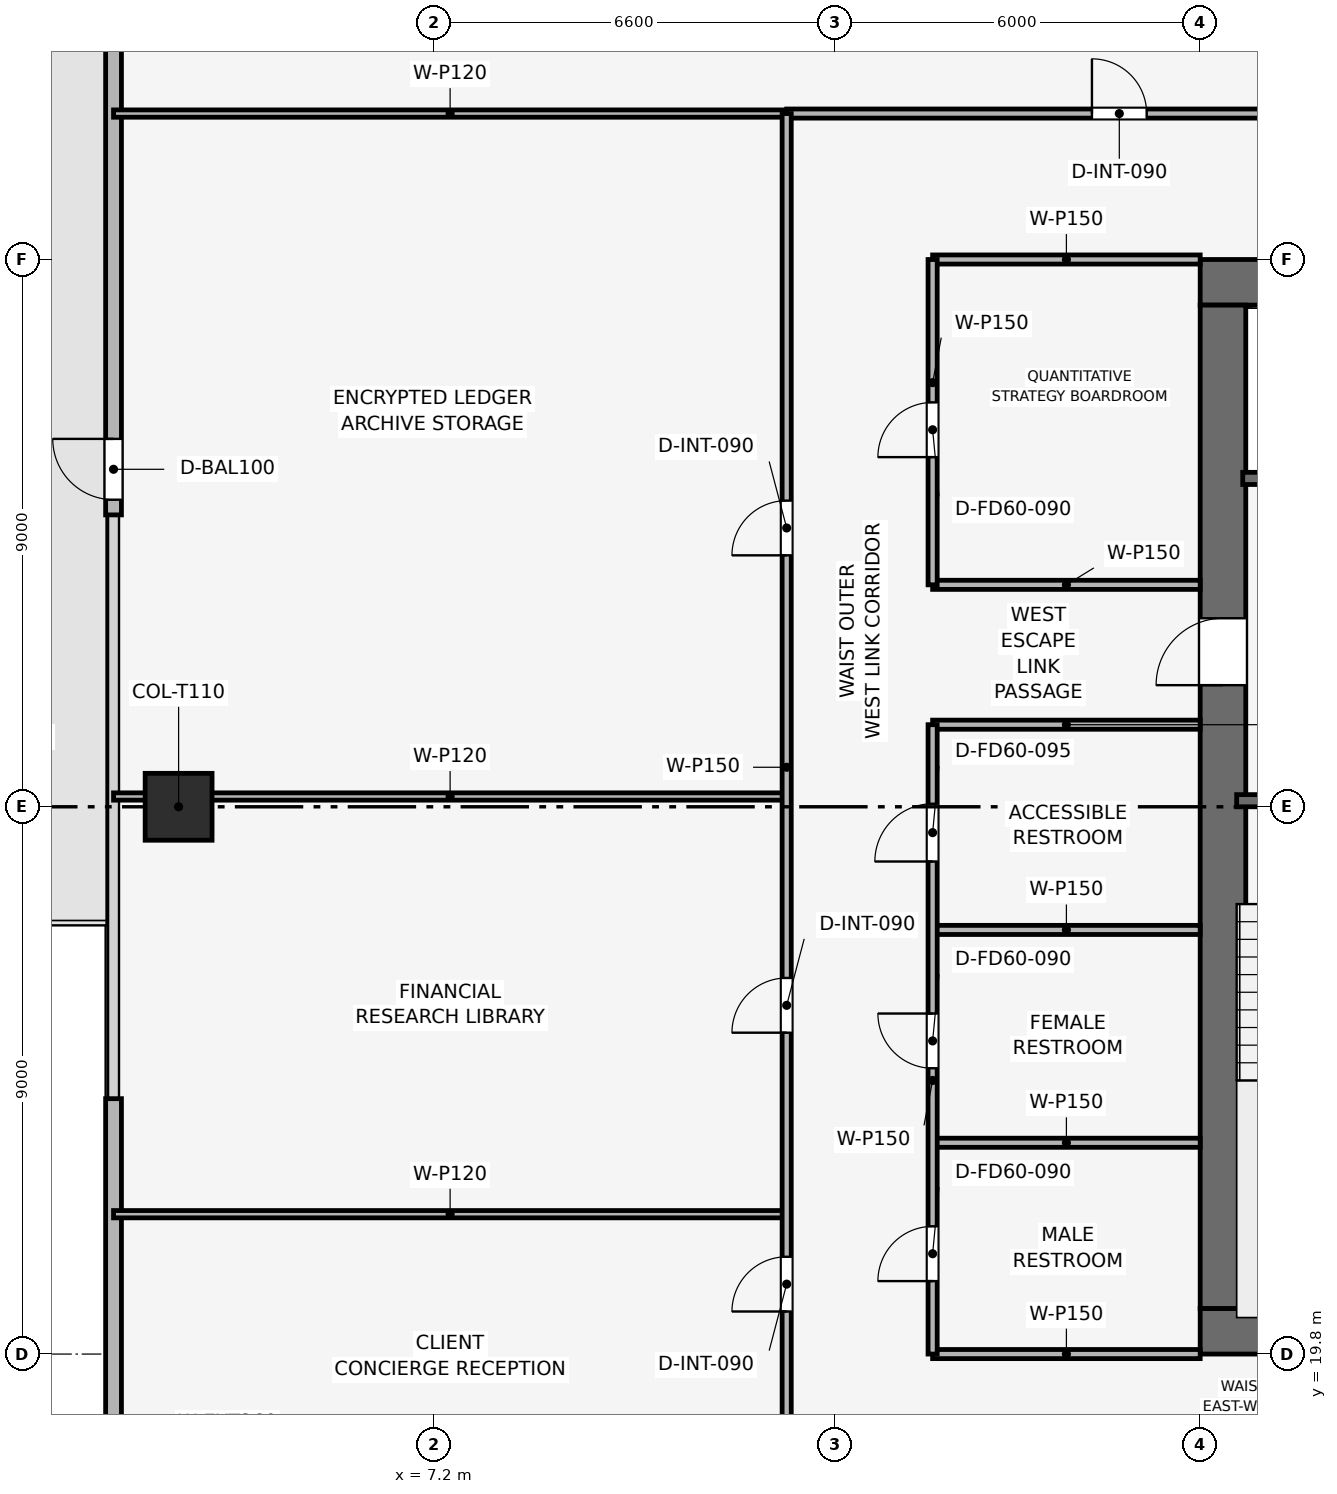
"""IFC4 building model, lengths in metres.
Left out: names, types, materials, properties, quantities, classifications, styles, units other than length and angle.
Written with IfcOpenShell. Run it as: python <this file> out.ifc"""

import sys

from ifc_helpers import new_model, si_unit, direction, frame, frame_2d, origin, origin_2d, place, context, subcontext, project, spatial, rectangle, extrude, element, fill, save


model = new_model("IFC4")
c1 = context("Model", 3, precision=1e-05, world=origin(), true_north=direction((0.0, 1.0)))
c2 = subcontext(c1, "Body", "Model", "MODEL_VIEW")
j1 = project(units=[si_unit("LENGTHUNIT", "METRE"), si_unit("PLANEANGLEUNIT", "RADIAN")], contexts=[c1])
p1 = place(None, origin())
s1 = spatial("IfcSite", under=j1, at=p1, CompositionType="ELEMENT")
p2 = place(p1, origin())
s2 = spatial("IfcBuilding", under=s1, at=p2, CompositionType="ELEMENT")
p3 = place(p2, frame((0.0, 0.0, 207.45)))
s3 = spatial("IfcBuildingStorey", under=s2, at=p3, CompositionType="ELEMENT", Elevation=207.45)
p4 = place(p3, frame((19.8, 20.175, 0.0), z_axis=(0.0, 0.0, 1.0), x_axis=(1.0, 0.0, 0.0)))
e1 = element("IfcWall", 1, at=p4, inside=s3, PredefinedType="SHEAR", context=c2, shape_type="SweptSolid", body=[
    extrude(rectangle(XDim=18.0, YDim=0.75, at=frame_2d((9.0, 0.0))), origin(), (0.0, 0.0, 1.0), 3.75),
])
p5 = place(p4, frame((8.4, 0.0, 0.0)))
e2 = element("IfcOpeningElement", 2, at=p5, cuts=e1, PredefinedType="OPENING", context=c2, shape_type="SweptSolid", body=[
    extrude(rectangle(XDim=1.2, YDim=2.2, at=frame_2d((0.6, 1.1))), frame((0.0, 0.385, 0.0), z_axis=(0.0, -1.0, 0.0), x_axis=(1.0, 0.0, 0.0)), (0.0, 0.0, 1.0), 0.77),
])
p6 = place(p3, frame((19.8, 37.425, 0.0), z_axis=(0.0, 0.0, 1.0), x_axis=(1.0, 0.0, 0.0)))
e3 = element("IfcWall", 3, at=p6, inside=s3, PredefinedType="SHEAR", context=c2, shape_type="SweptSolid", body=[
    extrude(rectangle(XDim=18.0, YDim=0.75, at=frame_2d((9.0, 0.0))), origin(), (0.0, 0.0, 1.0), 3.75),
])
p7 = place(p6, frame((7.05, 0.0, 0.0)))
e4 = element("IfcOpeningElement", 4, at=p7, cuts=e3, PredefinedType="OPENING", context=c2, shape_type="SweptSolid", body=[
    extrude(rectangle(XDim=1.1, YDim=2.15, at=frame_2d((0.55, 1.075))), frame((0.0, 0.385, 0.0), z_axis=(0.0, -1.0, 0.0), x_axis=(1.0, 0.0, 0.0)), (0.0, 0.0, 1.0), 0.77),
])
p8 = place(p3, frame((20.175, 20.55, 0.0), z_axis=(0.0, 0.0, 1.0), x_axis=(0.0, 1.0, 0.0)))
e5 = element("IfcWall", 5, at=p8, inside=s3, PredefinedType="SHEAR", context=c2, shape_type="SweptSolid", body=[
    extrude(rectangle(XDim=16.5, YDim=0.75, at=frame_2d((8.25, 0.0))), origin(), (0.0, 0.0, 1.0), 3.75),
])
p9 = place(p8, frame((10.25, 0.0, 0.0)))
e6 = element("IfcOpeningElement", 6, at=p9, cuts=e5, PredefinedType="OPENING", context=c2, shape_type="SweptSolid", body=[
    extrude(rectangle(XDim=1.1, YDim=2.15, at=frame_2d((0.55, 1.075))), frame((0.0, 0.385, 0.0), z_axis=(0.0, -1.0, 0.0), x_axis=(1.0, 0.0, 0.0)), (0.0, 0.0, 1.0), 0.77),
])
p10 = place(p3, frame((3.0, 28.8, 0.003), z_axis=(0.0, 0.0, 1.0), x_axis=(1.0, 0.0, 0.0)))
e7 = element("IfcColumn", 7, at=p10, inside=s3, PredefinedType="COLUMN", context=c2, shape_type="SweptSolid", body=[
    extrude(rectangle(XDim=1.1, YDim=1.1, at=origin_2d()), origin(), (0.0, 0.0, 1.0), 3.494),
])
p11 = place(p3, frame((1.93, 9.3, 0.0), z_axis=(0.0, 0.0, 1.0), x_axis=(0.0, 1.0, 0.0)))
e8 = element("IfcWall", 8, at=p11, inside=s3, PredefinedType="SOLIDWALL", context=c2, shape_type="SweptSolid", body=[
    extrude(rectangle(XDim=14.7, YDim=0.26, at=frame_2d((7.35, 0.0))), origin(), (0.0, 0.0, 1.0), 3.5),
])
p12 = place(p11, frame((0.25, 0.0, 0.9)))
e9 = element("IfcOpeningElement", 9, at=p12, cuts=e8, PredefinedType="OPENING", context=c2, shape_type="SweptSolid", body=[
    extrude(rectangle(XDim=3.8, YDim=1.9, at=frame_2d((1.9, 0.95))), frame((0.0, 0.14, 0.0), z_axis=(0.0, -1.0, 0.0), x_axis=(1.0, 0.0, 0.0)), (0.0, 0.0, 1.0), 0.28),
])
p13 = place(p3, frame((1.93, 33.6, 0.0), z_axis=(0.0, 0.0, 1.0), x_axis=(0.0, 1.0, 0.0)))
e10 = element("IfcWall", 10, at=p13, inside=s3, PredefinedType="SOLIDWALL", context=c2, shape_type="SweptSolid", body=[
    extrude(rectangle(XDim=14.7, YDim=0.26, at=frame_2d((7.35, 0.0))), origin(), (0.0, 0.0, 1.0), 3.5),
])
p14 = place(p13, frame((0.25, 0.0, 0.0)))
e11 = element("IfcOpeningElement", 11, at=p14, cuts=e10, PredefinedType="OPENING", context=c2, shape_type="SweptSolid", body=[
    extrude(rectangle(XDim=1.0, YDim=2.2, at=frame_2d((0.5, 1.1))), frame((0.0, 0.14, 0.0), z_axis=(0.0, -1.0, 0.0), x_axis=(1.0, 0.0, 0.0)), (0.0, 0.0, 1.0), 0.28),
])
p15 = place(p3, frame((20.4, 28.9, 0.0), z_axis=(0.0, 0.0, 1.0), x_axis=(1.0, 0.0, 0.0)))
e12 = element("IfcWall", 12, at=p15, inside=s3, PredefinedType="SHEAR", context=c2, shape_type="SweptSolid", body=[
    extrude(rectangle(XDim=3.15, YDim=0.2, at=frame_2d((1.575, 0.0))), origin(), (0.0, 0.0, 1.0), 3.5),
])
p16 = place(p15, frame((0.8, 0.0, 0.0)))
e13 = element("IfcOpeningElement", 13, at=p16, cuts=e12, PredefinedType="OPENING", context=c2, shape_type="SweptSolid", body=[
    extrude(rectangle(XDim=1.0, YDim=2.1, at=frame_2d((0.5, 1.05))), frame((0.0, 0.11, 0.0), z_axis=(0.0, -1.0, 0.0), x_axis=(1.0, 0.0, 0.0)), (0.0, 0.0, 1.0), 0.22),
])
p17 = place(p3, frame((20.5, 34.2, 0.0), z_axis=(0.0, 0.0, 1.0), x_axis=(1.0, 0.0, 0.0)))
e14 = element("IfcWall", 14, at=p17, inside=s3, PredefinedType="SHEAR", context=c2, shape_type="SweptSolid", body=[
    extrude(rectangle(XDim=3.05, YDim=0.2, at=frame_2d((1.525, 0.0))), origin(), (0.0, 0.0, 1.0), 3.5),
])
p18 = place(p17, frame((0.75, 0.0, 0.0)))
e15 = element("IfcOpeningElement", 15, at=p18, cuts=e14, PredefinedType="OPENING", context=c2, shape_type="SweptSolid", body=[
    extrude(rectangle(XDim=1.1, YDim=2.15, at=frame_2d((0.55, 1.075))), frame((0.0, 0.11, 0.0), z_axis=(0.0, -1.0, 0.0), x_axis=(1.0, 0.0, 0.0)), (0.0, 0.0, 1.0), 0.22),
])
p19 = place(p3, frame((15.4, 19.8, 0.0), z_axis=(0.0, 0.0, 1.0), x_axis=(1.0, 0.0, 0.0)))
e16 = element("IfcWall", 16, at=p19, inside=s3, PredefinedType="PARTITIONING", context=c2, shape_type="SweptSolid", body=[
    extrude(rectangle(XDim=4.4, YDim=0.15, at=frame_2d((2.2, 0.0))), origin(), (0.0, 0.0, 1.0), 3.035),
])
for number, where, z_axis, x_axis in (
    (17, (15.4, 23.275, 0.0), (0.0, 0.0, 1.0), (1.0, 0.0, 0.0)),
    (18, (15.4, 26.775, 0.0), (0.0, 0.0, 1.0), (1.0, 0.0, 0.0)),
    (19, (15.4, 30.15, 0.0), (0.0, 0.0, 1.0), (1.0, 0.0, 0.0)),
    (20, (15.4, 32.45, 0.0), (0.0, 0.0, 1.0), (1.0, 0.0, 0.0)),
):
    element("IfcWall", number, at=place(p3, frame(where, z_axis=z_axis, x_axis=x_axis)), inside=s3, PredefinedType="PARTITIONING", context=c2, shape_type="SweptSolid", body=[
        extrude(rectangle(XDim=4.4, YDim=0.15, at=frame_2d((2.2, 0.0))), origin(), (0.0, 0.0, 1.0), 3.5),
    ])
p20 = place(p3, frame((15.4, 37.8, 0.0), z_axis=(0.0, 0.0, 1.0), x_axis=(1.0, 0.0, 0.0)))
e21 = element("IfcWall", 21, at=p20, inside=s3, PredefinedType="PARTITIONING", context=c2, shape_type="SweptSolid", body=[
    extrude(rectangle(XDim=4.4, YDim=0.15, at=frame_2d((2.2, 0.0))), origin(), (0.0, 0.0, 1.0), 3.035),
])
p21 = place(p3, frame((15.4, 19.8, 0.0), z_axis=(0.0, 0.0, 1.0), x_axis=(0.0, 1.0, 0.0)))
e22 = element("IfcWall", 22, at=p21, inside=s3, PredefinedType="PARTITIONING", context=c2, shape_type="SweptSolid", body=[
    extrude(rectangle(XDim=10.35, YDim=0.15, at=frame_2d((5.175, 0.0))), origin(), (0.0, 0.0, 1.0), 3.035),
])
p22 = place(p21, frame((1.2, 0.0, 0.0)))
e23 = element("IfcOpeningElement", 23, at=p22, cuts=e22, PredefinedType="OPENING", context=c2, shape_type="SweptSolid", body=[
    extrude(rectangle(XDim=0.9, YDim=2.1, at=frame_2d((0.45, 1.05))), frame((0.0, 0.085, 0.0), z_axis=(0.0, -1.0, 0.0), x_axis=(1.0, 0.0, 0.0)), (0.0, 0.0, 1.0), 0.17),
])
p23 = place(p21, frame((4.7, 0.0, 0.0)))
e24 = element("IfcOpeningElement", 24, at=p23, cuts=e22, PredefinedType="OPENING", context=c2, shape_type="SweptSolid", body=[
    extrude(rectangle(XDim=0.9, YDim=2.1, at=frame_2d((0.45, 1.05))), frame((0.0, 0.085, 0.0), z_axis=(0.0, -1.0, 0.0), x_axis=(1.0, 0.0, 0.0)), (0.0, 0.0, 1.0), 0.17),
])
p24 = place(p21, frame((8.1, 0.0, 0.0)))
e25 = element("IfcOpeningElement", 25, at=p24, cuts=e22, PredefinedType="OPENING", context=c2, shape_type="SweptSolid", body=[
    extrude(rectangle(XDim=0.95, YDim=2.1, at=frame_2d((0.475, 1.05))), frame((0.0, 0.085, 0.0), z_axis=(0.0, -1.0, 0.0), x_axis=(1.0, 0.0, 0.0)), (0.0, 0.0, 1.0), 0.17),
])
p25 = place(p3, frame((15.4, 32.45, 0.0), z_axis=(0.0, 0.0, 1.0), x_axis=(0.0, 1.0, 0.0)))
e26 = element("IfcWall", 26, at=p25, inside=s3, PredefinedType="PARTITIONING", context=c2, shape_type="SweptSolid", body=[
    extrude(rectangle(XDim=5.35, YDim=0.15, at=frame_2d((2.675, 0.0))), origin(), (0.0, 0.0, 1.0), 3.035),
])
p26 = place(p25, frame((2.1, 0.0, 0.0)))
e27 = element("IfcOpeningElement", 27, at=p26, cuts=e26, PredefinedType="OPENING", context=c2, shape_type="SweptSolid", body=[
    extrude(rectangle(XDim=0.9, YDim=2.1, at=frame_2d((0.45, 1.05))), frame((0.0, 0.085, 0.0), z_axis=(0.0, -1.0, 0.0), x_axis=(1.0, 0.0, 0.0)), (0.0, 0.0, 1.0), 0.17),
])
for number, where, z_axis, x_axis in (
    (28, (1.93, 22.1, 0.0), (0.0, 0.0, 1.0), (1.0, 0.0, 0.0)),
    (29, (1.93, 28.969, 0.0), (0.0, 0.0, 1.0), (1.0, 0.0, 0.0)),
    (30, (1.93, 40.2, 0.0), (0.0, 0.0, 1.0), (1.0, 0.0, 0.0)),
):
    element("IfcWall", number, at=place(p3, frame(where, z_axis=z_axis, x_axis=x_axis)), inside=s3, PredefinedType="PARTITIONING", context=c2, shape_type="SweptSolid", body=[
        extrude(rectangle(XDim=11.07, YDim=0.12, at=frame_2d((5.535, 0.0))), origin(), (0.0, 0.0, 1.0), 2.885),
    ])
p27 = place(p3, frame((13.0, 40.2, 0.0), z_axis=(0.0, 0.0, 1.0), x_axis=(1.0, 0.0, 0.0)))
e31 = element("IfcWall", 31, at=p27, inside=s3, PredefinedType="PARTITIONING", context=c2, shape_type="SweptSolid", body=[
    extrude(rectangle(XDim=31.6, YDim=0.15, at=frame_2d((15.8, 0.0))), origin(), (0.0, 0.0, 1.0), 3.035),
])
p28 = place(p27, frame((5.02, 0.0, 0.0)))
e32 = element("IfcOpeningElement", 32, at=p28, cuts=e31, PredefinedType="OPENING", context=c2, shape_type="SweptSolid", body=[
    extrude(rectangle(XDim=0.9, YDim=2.1, at=frame_2d((0.45, 1.05))), frame((0.0, 0.085, 0.0), z_axis=(0.0, -1.0, 0.0), x_axis=(1.0, 0.0, 0.0)), (0.0, 0.0, 1.0), 0.17),
])
p29 = place(p27, frame((20.82, 0.0, 0.0)))
e33 = element("IfcOpeningElement", 33, at=p29, cuts=e31, PredefinedType="OPENING", context=c2, shape_type="SweptSolid", body=[
    extrude(rectangle(XDim=0.9, YDim=2.1, at=frame_2d((0.45, 1.05))), frame((0.0, 0.085, 0.0), z_axis=(0.0, -1.0, 0.0), x_axis=(1.0, 0.0, 0.0)), (0.0, 0.0, 1.0), 0.17),
])
p30 = place(p3, frame((13.0, 17.4, 0.0), z_axis=(0.0, 0.0, 1.0), x_axis=(0.0, 1.0, 0.0)))
e34 = element("IfcWall", 34, at=p30, inside=s3, PredefinedType="PARTITIONING", context=c2, shape_type="SweptSolid", body=[
    extrude(rectangle(XDim=22.8, YDim=0.15, at=frame_2d((11.4, 0.0))), origin(), (0.0, 0.0, 1.0), 3.035),
])
p31 = place(p30, frame((3.1, 0.0, 0.0)))
e35 = element("IfcOpeningElement", 35, at=p31, cuts=e34, PredefinedType="OPENING", context=c2, shape_type="SweptSolid", body=[
    extrude(rectangle(XDim=0.9, YDim=2.1, at=frame_2d((0.45, 1.05))), frame((0.0, 0.085, 0.0), z_axis=(0.0, -1.0, 0.0), x_axis=(1.0, 0.0, 0.0)), (0.0, 0.0, 1.0), 0.17),
])
p32 = place(p30, frame((7.685, 0.0, 0.0)))
e36 = element("IfcOpeningElement", 36, at=p32, cuts=e34, PredefinedType="OPENING", context=c2, shape_type="SweptSolid", body=[
    extrude(rectangle(XDim=0.9, YDim=2.1, at=frame_2d((0.45, 1.05))), frame((0.0, 0.085, 0.0), z_axis=(0.0, -1.0, 0.0), x_axis=(1.0, 0.0, 0.0)), (0.0, 0.0, 1.0), 0.17),
])
p33 = place(p30, frame((15.535, 0.0, 0.0)))
e37 = element("IfcOpeningElement", 37, at=p33, cuts=e34, PredefinedType="OPENING", context=c2, shape_type="SweptSolid", body=[
    extrude(rectangle(XDim=0.9, YDim=2.1, at=frame_2d((0.45, 1.05))), frame((0.0, 0.085, 0.0), z_axis=(0.0, -1.0, 0.0), x_axis=(1.0, 0.0, 0.0)), (0.0, 0.0, 1.0), 0.17),
])
p34 = place(p14, origin())
e38 = element("IfcDoor", 38, at=p34, inside=s3, OperationType="SINGLE_SWING_RIGHT", PredefinedType="DOOR", context=c2, shape_type="SweptSolid", body=[
    extrude(rectangle(XDim=1.0, YDim=2.2, at=frame_2d((0.5, 1.1))), frame((0.0, 0.025, 0.0), z_axis=(0.0, -1.0, 0.0), x_axis=(1.0, 0.0, 0.0)), (0.0, 0.0, 1.0), 0.05),
])
fill(e11, e38)
p35 = place(p22, origin())
e39 = element("IfcDoor", 39, at=p35, inside=s3, OperationType="SINGLE_SWING_LEFT", PredefinedType="DOOR", context=c2, shape_type="SweptSolid", body=[
    extrude(rectangle(XDim=0.9, YDim=2.1, at=frame_2d((0.45, 1.05))), frame((0.0, 0.025, 0.0), z_axis=(0.0, -1.0, 0.0), x_axis=(1.0, 0.0, 0.0)), (0.0, 0.0, 1.0), 0.05),
])
fill(e23, e39)
p36 = place(p23, origin())
e40 = element("IfcDoor", 40, at=p36, inside=s3, OperationType="SINGLE_SWING_RIGHT", PredefinedType="DOOR", context=c2, shape_type="SweptSolid", body=[
    extrude(rectangle(XDim=0.9, YDim=2.1, at=frame_2d((0.45, 1.05))), frame((0.0, 0.025, 0.0), z_axis=(0.0, -1.0, 0.0), x_axis=(1.0, 0.0, 0.0)), (0.0, 0.0, 1.0), 0.05),
])
fill(e24, e40)
p37 = place(p24, origin())
e41 = element("IfcDoor", 41, at=p37, inside=s3, OperationType="SINGLE_SWING_LEFT", PredefinedType="DOOR", context=c2, shape_type="SweptSolid", body=[
    extrude(rectangle(XDim=0.95, YDim=2.1, at=frame_2d((0.475, 1.05))), frame((0.0, 0.025, 0.0), z_axis=(0.0, -1.0, 0.0), x_axis=(1.0, 0.0, 0.0)), (0.0, 0.0, 1.0), 0.05),
])
fill(e25, e41)
p38 = place(p26, origin())
e42 = element("IfcDoor", 42, at=p38, inside=s3, OperationType="SINGLE_SWING_LEFT", PredefinedType="DOOR", context=c2, shape_type="SweptSolid", body=[
    extrude(rectangle(XDim=0.9, YDim=2.1, at=frame_2d((0.45, 1.05))), frame((0.0, 0.025, 0.0), z_axis=(0.0, -1.0, 0.0), x_axis=(1.0, 0.0, 0.0)), (0.0, 0.0, 1.0), 0.05),
])
fill(e27, e42)
p39 = place(p28, origin())
e43 = element("IfcDoor", 43, at=p39, inside=s3, OperationType="SINGLE_SWING_LEFT", PredefinedType="DOOR", context=c2, shape_type="SweptSolid", body=[
    extrude(rectangle(XDim=0.9, YDim=2.1, at=frame_2d((0.45, 1.05))), frame((0.0, 0.025, 0.0), z_axis=(0.0, -1.0, 0.0), x_axis=(1.0, 0.0, 0.0)), (0.0, 0.0, 1.0), 0.05),
])
fill(e32, e43)
p40 = place(p31, origin())
e44 = element("IfcDoor", 44, at=p40, inside=s3, OperationType="SINGLE_SWING_LEFT", PredefinedType="DOOR", context=c2, shape_type="SweptSolid", body=[
    extrude(rectangle(XDim=0.9, YDim=2.1, at=frame_2d((0.45, 1.05))), frame((0.0, 0.025, 0.0), z_axis=(0.0, -1.0, 0.0), x_axis=(1.0, 0.0, 0.0)), (0.0, 0.0, 1.0), 0.05),
])
fill(e35, e44)
p41 = place(p32, origin())
e45 = element("IfcDoor", 45, at=p41, inside=s3, OperationType="SINGLE_SWING_LEFT", PredefinedType="DOOR", context=c2, shape_type="SweptSolid", body=[
    extrude(rectangle(XDim=0.9, YDim=2.1, at=frame_2d((0.45, 1.05))), frame((0.0, 0.025, 0.0), z_axis=(0.0, -1.0, 0.0), x_axis=(1.0, 0.0, 0.0)), (0.0, 0.0, 1.0), 0.05),
])
fill(e36, e45)
p42 = place(p33, origin())
e46 = element("IfcDoor", 46, at=p42, inside=s3, OperationType="SINGLE_SWING_LEFT", PredefinedType="DOOR", context=c2, shape_type="SweptSolid", body=[
    extrude(rectangle(XDim=0.9, YDim=2.1, at=frame_2d((0.45, 1.05))), frame((0.0, 0.025, 0.0), z_axis=(0.0, -1.0, 0.0), x_axis=(1.0, 0.0, 0.0)), (0.0, 0.0, 1.0), 0.05),
])
fill(e37, e46)
p43 = place(p9, origin())
e47 = element("IfcDoor", 47, at=p43, inside=s3, OperationType="SINGLE_SWING_LEFT", PredefinedType="DOOR", context=c2, shape_type="SweptSolid", body=[
    extrude(rectangle(XDim=1.1, YDim=2.15, at=frame_2d((0.55, 1.075))), frame((0.0, 0.025, 0.0), z_axis=(0.0, -1.0, 0.0), x_axis=(1.0, 0.0, 0.0)), (0.0, 0.0, 1.0), 0.05),
])
fill(e6, e47)
save(model, sys.argv[1])
